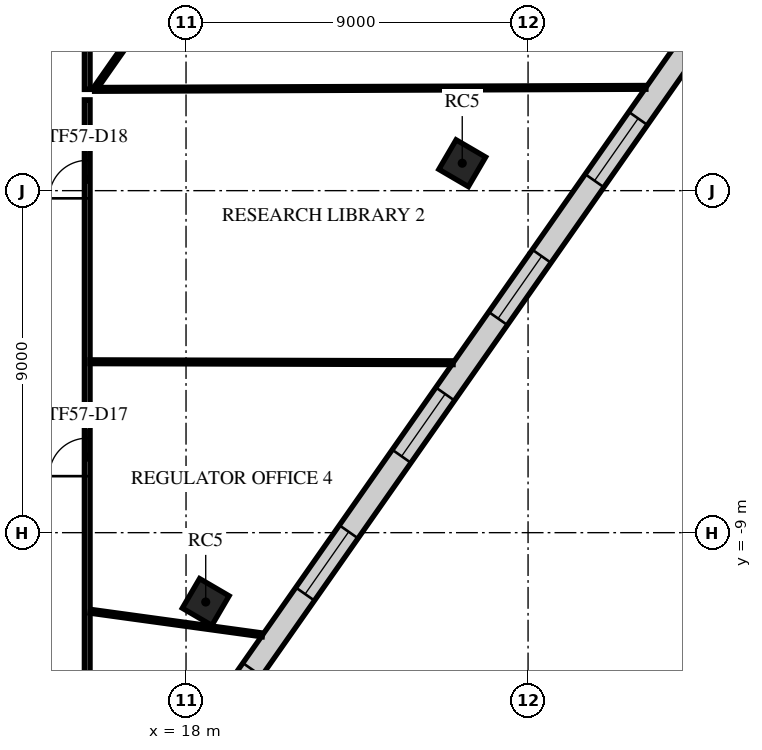
"""IFC4 building model, lengths in metres.
Left out: names, types, materials, properties, quantities, classifications, styles, units other than length and angle.
Written with IfcOpenShell. Run it as: python <this file> out.ifc"""

import sys

from ifc_helpers import new_model, si_unit, direction, frame, frame_2d, origin, origin_2d, place, context, subcontext, project, spatial, rectangle, extrude, element, fill, save


model = new_model("IFC4")
c1 = context("Model", 3, precision=1e-05, world=origin(), true_north=direction((0.0, 1.0)))
c2 = subcontext(c1, "Body", "Model", "MODEL_VIEW")
j1 = project(units=[si_unit("LENGTHUNIT", "METRE"), si_unit("PLANEANGLEUNIT", "RADIAN")], contexts=[c1])
p1 = place(None, origin())
s1 = spatial("IfcSite", under=j1, at=p1, CompositionType="ELEMENT")
p2 = place(p1, origin())
s2 = spatial("IfcBuilding", under=s1, at=p2, CompositionType="ELEMENT")
p3 = place(p2, frame((0.0, 0.0, 246.9)))
s3 = spatial("IfcBuildingStorey", under=s2, at=p3, CompositionType="ELEMENT", Elevation=246.9)
for number, where, z_axis, x_axis in (
    (1, (18.518, -10.825, 0.0), (0.0, 0.0, 1.0), (0.505, 0.863, 0.0)),
    (2, (25.268, 0.722, 0.0), (0.0, 0.0, 1.0), (0.505, 0.863, 0.0)),
):
    element("IfcColumn", number, at=place(p3, frame(where, z_axis=z_axis, x_axis=x_axis)), inside=s3, PredefinedType="COLUMN", context=c2, shape_type="SweptSolid", body=[
        extrude(rectangle(XDim=0.9, YDim=0.9, at=origin_2d()), origin(), (0.0, 0.0, 1.0), 4.0),
    ])
p4 = place(p3, frame((5.206, -33.362, 0.0), z_axis=(0.0, 0.0, 1.0), x_axis=(0.573577438409, 0.81915134264, 0.0)))
e3 = element("IfcWall", 3, at=p4, inside=s3, PredefinedType="STANDARD", context=c2, shape_type="SweptSolid", body=[
    extrude(rectangle(XDim=48.686, YDim=0.6, at=frame_2d((24.343, 0.0))), origin(), (0.0, 0.0, 1.0), 3.64),
])
p5 = place(p4, frame((1.213, 0.0, 0.9)))
e4 = element("IfcOpeningElement", 4, at=p5, cuts=e3, PredefinedType="OPENING", context=c2, shape_type="SweptSolid", body=[
    extrude(rectangle(XDim=2.0, YDim=2.1, at=frame_2d((1.0, 1.05))), frame((0.0, 0.31, 0.0), z_axis=(0.0, -1.0, 0.0), x_axis=(1.0, 0.0, 0.0)), (0.0, 0.0, 1.0), 0.62),
])
p6 = place(p4, frame((5.639, 0.0, 0.9)))
e5 = element("IfcOpeningElement", 5, at=p6, cuts=e3, PredefinedType="OPENING", context=c2, shape_type="SweptSolid", body=[
    extrude(rectangle(XDim=2.0, YDim=2.1, at=frame_2d((1.0, 1.05))), frame((0.0, 0.31, 0.0), z_axis=(0.0, -1.0, 0.0), x_axis=(1.0, 0.0, 0.0)), (0.0, 0.0, 1.0), 0.62),
])
p7 = place(p4, frame((10.065, 0.0, 0.9)))
e6 = element("IfcOpeningElement", 6, at=p7, cuts=e3, PredefinedType="OPENING", context=c2, shape_type="SweptSolid", body=[
    extrude(rectangle(XDim=2.0, YDim=2.1, at=frame_2d((1.0, 1.05))), frame((0.0, 0.31, 0.0), z_axis=(0.0, -1.0, 0.0), x_axis=(1.0, 0.0, 0.0)), (0.0, 0.0, 1.0), 0.62),
])
p8 = place(p4, frame((14.491, 0.0, 0.9)))
e7 = element("IfcOpeningElement", 7, at=p8, cuts=e3, PredefinedType="OPENING", context=c2, shape_type="SweptSolid", body=[
    extrude(rectangle(XDim=2.0, YDim=2.1, at=frame_2d((1.0, 1.05))), frame((0.0, 0.31, 0.0), z_axis=(0.0, -1.0, 0.0), x_axis=(1.0, 0.0, 0.0)), (0.0, 0.0, 1.0), 0.62),
])
p9 = place(p4, frame((18.917, 0.0, 0.9)))
e8 = element("IfcOpeningElement", 8, at=p9, cuts=e3, PredefinedType="OPENING", context=c2, shape_type="SweptSolid", body=[
    extrude(rectangle(XDim=2.0, YDim=2.1, at=frame_2d((1.0, 1.05))), frame((0.0, 0.31, 0.0), z_axis=(0.0, -1.0, 0.0), x_axis=(1.0, 0.0, 0.0)), (0.0, 0.0, 1.0), 0.62),
])
p10 = place(p4, frame((23.343, 0.0, 0.9)))
e9 = element("IfcOpeningElement", 9, at=p10, cuts=e3, PredefinedType="OPENING", context=c2, shape_type="SweptSolid", body=[
    extrude(rectangle(XDim=2.0, YDim=2.1, at=frame_2d((1.0, 1.05))), frame((0.0, 0.31, 0.0), z_axis=(0.0, -1.0, 0.0), x_axis=(1.0, 0.0, 0.0)), (0.0, 0.0, 1.0), 0.62),
])
p11 = place(p4, frame((27.769, 0.0, 0.9)))
e10 = element("IfcOpeningElement", 10, at=p11, cuts=e3, PredefinedType="OPENING", context=c2, shape_type="SweptSolid", body=[
    extrude(rectangle(XDim=2.0, YDim=2.1, at=frame_2d((1.0, 1.05))), frame((0.0, 0.31, 0.0), z_axis=(0.0, -1.0, 0.0), x_axis=(1.0, 0.0, 0.0)), (0.0, 0.0, 1.0), 0.62),
])
p12 = place(p4, frame((32.195, 0.0, 0.9)))
e11 = element("IfcOpeningElement", 11, at=p12, cuts=e3, PredefinedType="OPENING", context=c2, shape_type="SweptSolid", body=[
    extrude(rectangle(XDim=2.0, YDim=2.1, at=frame_2d((1.0, 1.05))), frame((0.0, 0.31, 0.0), z_axis=(0.0, -1.0, 0.0), x_axis=(1.0, 0.0, 0.0)), (0.0, 0.0, 1.0), 0.62),
])
p13 = place(p4, frame((36.621, 0.0, 0.9)))
e12 = element("IfcOpeningElement", 12, at=p13, cuts=e3, PredefinedType="OPENING", context=c2, shape_type="SweptSolid", body=[
    extrude(rectangle(XDim=2.0, YDim=2.1, at=frame_2d((1.0, 1.05))), frame((0.0, 0.31, 0.0), z_axis=(0.0, -1.0, 0.0), x_axis=(1.0, 0.0, 0.0)), (0.0, 0.0, 1.0), 0.62),
])
p14 = place(p4, frame((41.047, 0.0, 0.9)))
e13 = element("IfcOpeningElement", 13, at=p14, cuts=e3, PredefinedType="OPENING", context=c2, shape_type="SweptSolid", body=[
    extrude(rectangle(XDim=2.0, YDim=2.1, at=frame_2d((1.0, 1.05))), frame((0.0, 0.31, 0.0), z_axis=(0.0, -1.0, 0.0), x_axis=(1.0, 0.0, 0.0)), (0.0, 0.0, 1.0), 0.62),
])
p15 = place(p4, frame((45.473, 0.0, 0.9)))
e14 = element("IfcOpeningElement", 14, at=p15, cuts=e3, PredefinedType="OPENING", context=c2, shape_type="SweptSolid", body=[
    extrude(rectangle(XDim=2.0, YDim=2.1, at=frame_2d((1.0, 1.05))), frame((0.0, 0.31, 0.0), z_axis=(0.0, -1.0, 0.0), x_axis=(1.0, 0.0, 0.0)), (0.0, 0.0, 1.0), 0.62),
])
p16 = place(p3, frame((15.4, -15.325, 0.0), z_axis=(0.0, 0.0, 1.0), x_axis=(0.0, 1.0, 0.0)))
e15 = element("IfcWall", 15, at=p16, inside=s3, PredefinedType="PARTITIONING", context=c2, shape_type="SweptSolid", body=[
    extrude(rectangle(XDim=17.715, YDim=0.15, at=frame_2d((8.857, 0.0))), origin(), (0.0, 0.0, 1.0), 3.24),
])
p17 = place(p16, frame((7.812, 0.0, 0.0)))
e16 = element("IfcOpeningElement", 16, at=p17, cuts=e15, PredefinedType="OPENING", context=c2, shape_type="SweptSolid", body=[
    extrude(rectangle(XDim=1.0, YDim=2.1, at=frame_2d((0.5, 1.05))), frame((0.0, 0.085, 0.0), z_axis=(0.0, -1.0, 0.0), x_axis=(1.0, 0.0, 0.0)), (0.0, 0.0, 1.0), 0.17),
])
p18 = place(p16, frame((15.123, 0.0, 0.0)))
e17 = element("IfcOpeningElement", 17, at=p18, cuts=e15, PredefinedType="OPENING", context=c2, shape_type="SweptSolid", body=[
    extrude(rectangle(XDim=1.0, YDim=2.1, at=frame_2d((0.5, 1.05))), frame((0.0, 0.085, 0.0), z_axis=(0.0, -1.0, 0.0), x_axis=(1.0, 0.0, 0.0)), (0.0, 0.0, 1.0), 0.17),
])
p19 = place(p3, frame((15.4, 2.664, 0.0), z_axis=(0.0, 0.0, 1.0), x_axis=(0.0, 1.0, 0.0)))
e18 = element("IfcWall", 18, at=p19, inside=s3, PredefinedType="PARTITIONING", context=c2, shape_type="SweptSolid", body=[
    extrude(rectangle(XDim=9.526, YDim=0.15, at=frame_2d((4.763, 0.0))), origin(), (0.0, 0.0, 1.0), 3.24),
])
p20 = place(p3, frame((15.482, -11.068, 0.0), z_axis=(0.0, 0.0, 1.0), x_axis=(0.990680100766, -0.136209169832, 0.0)))
e19 = element("IfcWall", 19, at=p20, inside=s3, PredefinedType="PARTITIONING", context=c2, shape_type="SweptSolid", body=[
    extrude(rectangle(XDim=4.573, YDim=0.1, at=frame_2d((2.286, 0.0))), origin(), (0.0, 0.0, 1.0), 3.12),
])
p21 = place(p3, frame((15.475, -4.502, 0.0), z_axis=(0.0, 0.0, 1.0), x_axis=(0.999996329774, -0.00270932448, 0.0)))
e20 = element("IfcWall", 20, at=p21, inside=s3, PredefinedType="PARTITIONING", context=c2, shape_type="SweptSolid", body=[
    extrude(rectangle(XDim=9.552, YDim=0.1, at=frame_2d((4.776, 0.0))), origin(), (0.0, 0.0, 1.0), 3.24),
])
p22 = place(p3, frame((15.593, 2.665, 0.0), z_axis=(0.0, 0.0, 1.0), x_axis=(0.999993270933, 0.003668526741, 0.0)))
e21 = element("IfcWall", 21, at=p22, inside=s3, PredefinedType="PARTITIONING", context=c2, shape_type="SweptSolid", body=[
    extrude(rectangle(XDim=14.508, YDim=0.1, at=frame_2d((7.254, 0.0))), origin(), (0.0, 0.0, 1.0), 3.64),
])
p23 = place(p3, frame((15.648, 2.744, 0.0), z_axis=(0.0, 0.0, 1.0), x_axis=(0.57357562998, 0.819152608915, 0.0)))
e22 = element("IfcWall", 22, at=p23, inside=s3, PredefinedType="PARTITIONING", context=c2, shape_type="SweptSolid", body=[
    extrude(rectangle(XDim=7.521, YDim=0.1, at=frame_2d((3.76, 0.0))), origin(), (0.0, 0.0, 1.0), 3.24),
])
p24 = place(p10, origin())
e23 = element("IfcWindow", 23, at=p24, inside=s3, PartitioningType="SINGLE_PANEL", PredefinedType="WINDOW", context=c2, shape_type="SweptSolid", body=[
    extrude(rectangle(XDim=2.0, YDim=2.1, at=frame_2d((1.0, 1.05))), frame((0.0, 0.03, 0.0), z_axis=(0.0, -1.0, 0.0), x_axis=(1.0, 0.0, 0.0)), (0.0, 0.0, 1.0), 0.06),
])
fill(e9, e23)
p25 = place(p11, origin())
e24 = element("IfcWindow", 24, at=p25, inside=s3, PartitioningType="SINGLE_PANEL", PredefinedType="WINDOW", context=c2, shape_type="SweptSolid", body=[
    extrude(rectangle(XDim=2.0, YDim=2.1, at=frame_2d((1.0, 1.05))), frame((0.0, 0.03, 0.0), z_axis=(0.0, -1.0, 0.0), x_axis=(1.0, 0.0, 0.0)), (0.0, 0.0, 1.0), 0.06),
])
fill(e10, e24)
p26 = place(p12, origin())
e25 = element("IfcWindow", 25, at=p26, inside=s3, PartitioningType="SINGLE_PANEL", PredefinedType="WINDOW", context=c2, shape_type="SweptSolid", body=[
    extrude(rectangle(XDim=2.0, YDim=2.1, at=frame_2d((1.0, 1.05))), frame((0.0, 0.03, 0.0), z_axis=(0.0, -1.0, 0.0), x_axis=(1.0, 0.0, 0.0)), (0.0, 0.0, 1.0), 0.06),
])
fill(e11, e25)
p27 = place(p13, origin())
e26 = element("IfcWindow", 26, at=p27, inside=s3, PartitioningType="SINGLE_PANEL", PredefinedType="WINDOW", context=c2, shape_type="SweptSolid", body=[
    extrude(rectangle(XDim=2.0, YDim=2.1, at=frame_2d((1.0, 1.05))), frame((0.0, 0.03, 0.0), z_axis=(0.0, -1.0, 0.0), x_axis=(1.0, 0.0, 0.0)), (0.0, 0.0, 1.0), 0.06),
])
fill(e12, e26)
p28 = place(p14, origin())
e27 = element("IfcWindow", 27, at=p28, inside=s3, PartitioningType="SINGLE_PANEL", PredefinedType="WINDOW", context=c2, shape_type="SweptSolid", body=[
    extrude(rectangle(XDim=2.0, YDim=2.1, at=frame_2d((1.0, 1.05))), frame((0.0, 0.03, 0.0), z_axis=(0.0, -1.0, 0.0), x_axis=(1.0, 0.0, 0.0)), (0.0, 0.0, 1.0), 0.06),
])
fill(e13, e27)
p29 = place(p17, frame((1.0, 0.0, 0.0), z_axis=(0.0, 0.0, 1.0), x_axis=(-1.0, 0.0, 0.0)))
e28 = element("IfcDoor", 28, at=p29, inside=s3, OperationType="SINGLE_SWING_RIGHT", PredefinedType="DOOR", context=c2, shape_type="SweptSolid", body=[
    extrude(rectangle(XDim=1.0, YDim=2.1, at=frame_2d((0.5, 1.05))), frame((0.0, 0.025, 0.0), z_axis=(0.0, -1.0, 0.0), x_axis=(1.0, 0.0, 0.0)), (0.0, 0.0, 1.0), 0.05),
])
fill(e16, e28)
p30 = place(p18, frame((1.0, 0.0, 0.0), z_axis=(0.0, 0.0, 1.0), x_axis=(-1.0, 0.0, 0.0)))
e29 = element("IfcDoor", 29, at=p30, inside=s3, OperationType="SINGLE_SWING_RIGHT", PredefinedType="DOOR", context=c2, shape_type="SweptSolid", body=[
    extrude(rectangle(XDim=1.0, YDim=2.1, at=frame_2d((0.5, 1.05))), frame((0.0, 0.025, 0.0), z_axis=(0.0, -1.0, 0.0), x_axis=(1.0, 0.0, 0.0)), (0.0, 0.0, 1.0), 0.05),
])
fill(e17, e29)
save(model, sys.argv[1])
